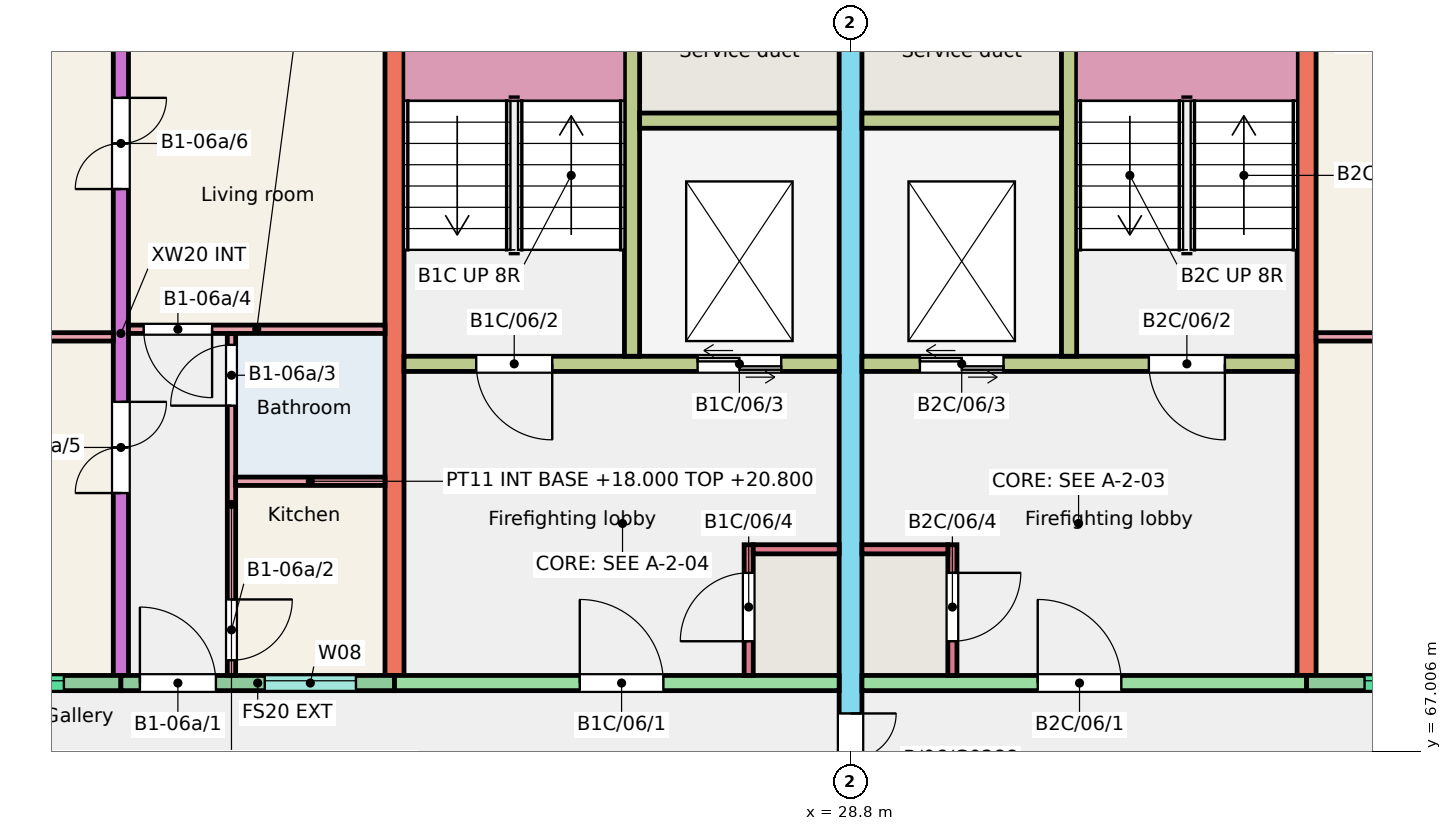
"""IFC4 building model, lengths in metres.
Left out: names, types, materials, properties, quantities, classifications, styles, units other than length and angle.
Written with IfcOpenShell. Run it as: python <this file> out.ifc"""

import sys

from ifc_helpers import new_model, si_unit, direction, frame, frame_2d, origin, place, context, subcontext, project, spatial, rectangle, extrude, element, fill, save


model = new_model("IFC4")
c1 = context("Model", 3, precision=1e-05, world=origin(), true_north=direction((0.0, 1.0)))
c2 = subcontext(c1, "Body", "Model", "MODEL_VIEW")
j1 = project(units=[si_unit("LENGTHUNIT", "METRE"), si_unit("PLANEANGLEUNIT", "RADIAN")], contexts=[c1])
p1 = place(None, origin())
s1 = spatial("IfcSite", under=j1, at=p1, CompositionType="ELEMENT")
p2 = place(p1, origin())
s2 = spatial("IfcBuilding", under=s1, at=p2, CompositionType="ELEMENT")
p3 = place(p2, frame((0.0, 0.0, 18.0)))
s3 = spatial("IfcBuildingStorey", under=s2, at=p3, CompositionType="ELEMENT", Elevation=18.0)
p4 = place(p3, frame((19.2, 68.0, 0.0), z_axis=(0.0, 0.0, 1.0), x_axis=(0.0, 1.0, 0.0)))
e1 = element("IfcWall", 1, at=p4, inside=s3, PredefinedType="SHEAR", context=c2, shape_type="SweptSolid", body=[
    extrude(rectangle(XDim=9.0, YDim=0.2, at=frame_2d((4.5, 0.0))), origin(), (0.0, 0.0, 1.0), 3.0),
])
p5 = place(p4, frame((2.4, 0.0, 0.0)))
e2 = element("IfcOpeningElement", 2, at=p5, cuts=e1, PredefinedType="OPENING", context=c2, shape_type="SweptSolid", body=[
    extrude(rectangle(XDim=1.2, YDim=2.1, at=frame_2d((0.6, 1.05))), frame((0.0, 0.11, 0.0), z_axis=(0.0, -1.0, 0.0), x_axis=(1.0, 0.0, 0.0)), (0.0, 0.0, 1.0), 0.22),
])
p6 = place(p4, frame((6.4, 0.0, 0.0)))
e3 = element("IfcOpeningElement", 3, at=p6, cuts=e1, PredefinedType="OPENING", context=c2, shape_type="SweptSolid", body=[
    extrude(rectangle(XDim=1.2, YDim=2.1, at=frame_2d((0.6, 1.05))), frame((0.0, 0.11, 0.0), z_axis=(0.0, -1.0, 0.0), x_axis=(1.0, 0.0, 0.0)), (0.0, 0.0, 1.0), 0.22),
])
p7 = place(p3, frame((22.8, 68.0, 0.0), z_axis=(0.0, 0.0, 1.0), x_axis=(0.0, 1.0, 0.0)))
e4 = element("IfcWall", 4, at=p7, inside=s3, PredefinedType="SHEAR", context=c2, shape_type="SweptSolid", body=[
    extrude(rectangle(XDim=9.0, YDim=0.25, at=frame_2d((4.5, 0.0))), origin(), (0.0, 0.0, 1.0), 3.0),
])
p8 = place(p3, frame((28.8, 66.0, 0.0), z_axis=(0.0, 0.0, 1.0), x_axis=(0.0, 1.0, 0.0)))
e5 = element("IfcWall", 5, at=p8, inside=s3, PredefinedType="SHEAR", context=c2, shape_type="SweptSolid", body=[
    extrude(rectangle(XDim=11.0, YDim=0.3, at=frame_2d((5.5, 0.0))), origin(), (0.0, 0.0, 1.0), 3.0),
])
p9 = place(p8, frame((0.3, 0.0, 0.0)))
e6 = element("IfcOpeningElement", 6, at=p9, cuts=e5, PredefinedType="OPENING", context=c2, shape_type="SweptSolid", body=[
    extrude(rectangle(XDim=1.2, YDim=2.1, at=frame_2d((0.6, 1.05))), frame((0.0, 0.16, 0.0), z_axis=(0.0, -1.0, 0.0), x_axis=(1.0, 0.0, 0.0)), (0.0, 0.0, 1.0), 0.32),
])
p10 = place(p3, frame((34.8, 68.0, 0.0), z_axis=(0.0, 0.0, 1.0), x_axis=(0.0, 1.0, 0.0)))
e7 = element("IfcWall", 7, at=p10, inside=s3, PredefinedType="SHEAR", context=c2, shape_type="SweptSolid", body=[
    extrude(rectangle(XDim=9.0, YDim=0.25, at=frame_2d((4.5, 0.0))), origin(), (0.0, 0.0, 1.0), 3.0),
])
p11 = place(p3, frame((15.6, 67.9, 0.0), z_axis=(0.0, 0.0, 1.0), x_axis=(1.0, 0.0, 0.0)))
e8 = element("IfcWall", 8, at=p11, inside=s3, PredefinedType="SOLIDWALL", context=c2, shape_type="SweptSolid", body=[
    extrude(rectangle(XDim=3.6, YDim=0.2, at=frame_2d((1.8, 0.0))), origin(), (0.0, 0.0, 1.0), 3.0),
])
p12 = place(p11, frame((0.75, 0.0, 1.2)))
e9 = element("IfcOpeningElement", 9, at=p12, cuts=e8, PredefinedType="OPENING", context=c2, shape_type="SweptSolid", body=[
    extrude(rectangle(XDim=2.1, YDim=1.2, at=frame_2d((1.05, 0.6))), frame((0.0, 0.11, 0.0), z_axis=(0.0, -1.0, 0.0), x_axis=(1.0, 0.0, 0.0)), (0.0, 0.0, 1.0), 0.22),
])
p13 = place(p3, frame((19.2, 67.9, 0.0), z_axis=(0.0, 0.0, 1.0), x_axis=(1.0, 0.0, 0.0)))
e10 = element("IfcWall", 10, at=p13, inside=s3, PredefinedType="SOLIDWALL", context=c2, shape_type="SweptSolid", body=[
    extrude(rectangle(XDim=3.6, YDim=0.2, at=frame_2d((1.8, 0.0))), origin(), (0.0, 0.0, 1.0), 3.0),
])
p14 = place(p13, frame((1.893, 0.0, 1.1)))
e11 = element("IfcOpeningElement", 11, at=p14, cuts=e10, PredefinedType="OPENING", context=c2, shape_type="SweptSolid", body=[
    extrude(rectangle(XDim=1.2, YDim=1.3, at=frame_2d((0.6, 0.65))), frame((0.0, 0.11, 0.0), z_axis=(0.0, -1.0, 0.0), x_axis=(1.0, 0.0, 0.0)), (0.0, 0.0, 1.0), 0.22),
])
p15 = place(p13, frame((0.25, 0.0, 0.0)))
e12 = element("IfcOpeningElement", 12, at=p15, cuts=e10, PredefinedType="OPENING", context=c2, shape_type="SweptSolid", body=[
    extrude(rectangle(XDim=1.0, YDim=2.1, at=frame_2d((0.5, 1.05))), frame((0.0, 0.11, 0.0), z_axis=(0.0, -1.0, 0.0), x_axis=(1.0, 0.0, 0.0)), (0.0, 0.0, 1.0), 0.22),
])
p16 = place(p3, frame((22.8, 67.9, 0.0), z_axis=(0.0, 0.0, 1.0), x_axis=(1.0, 0.0, 0.0)))
e13 = element("IfcWall", 13, at=p16, inside=s3, PredefinedType="SHEAR", context=c2, shape_type="SweptSolid", body=[
    extrude(rectangle(XDim=5.85, YDim=0.2, at=frame_2d((2.925, 0.0))), origin(), (0.0, 0.0, 1.0), 3.0),
])
p17 = place(p16, frame((2.438, 0.0, 0.0)))
e14 = element("IfcOpeningElement", 14, at=p17, cuts=e13, PredefinedType="OPENING", context=c2, shape_type="SweptSolid", body=[
    extrude(rectangle(XDim=1.1, YDim=2.1, at=frame_2d((0.55, 1.05))), frame((0.0, 0.11, 0.0), z_axis=(0.0, -1.0, 0.0), x_axis=(1.0, 0.0, 0.0)), (0.0, 0.0, 1.0), 0.22),
])
p18 = place(p3, frame((22.925, 72.1, 0.0), z_axis=(0.0, 0.0, 1.0), x_axis=(1.0, 0.0, 0.0)))
e15 = element("IfcWall", 15, at=p18, inside=s3, PredefinedType="SHEAR", context=c2, shape_type="SweptSolid", body=[
    extrude(rectangle(XDim=5.725, YDim=0.2, at=frame_2d((2.862, 0.0))), origin(), (0.0, 0.0, 1.0), 3.0),
])
p19 = place(p18, frame((0.95, 0.0, 0.0)))
e16 = element("IfcOpeningElement", 16, at=p19, cuts=e15, PredefinedType="OPENING", context=c2, shape_type="SweptSolid", body=[
    extrude(rectangle(XDim=1.0, YDim=2.1, at=frame_2d((0.5, 1.05))), frame((0.0, 0.11, 0.0), z_axis=(0.0, -1.0, 0.0), x_axis=(1.0, 0.0, 0.0)), (0.0, 0.0, 1.0), 0.22),
])
p20 = place(p18, frame((3.863, 0.0, 0.0)))
e17 = element("IfcOpeningElement", 17, at=p20, cuts=e15, PredefinedType="OPENING", context=c2, shape_type="SweptSolid", body=[
    extrude(rectangle(XDim=1.1, YDim=2.1, at=frame_2d((0.55, 1.05))), frame((0.0, 0.11, 0.0), z_axis=(0.0, -1.0, 0.0), x_axis=(1.0, 0.0, 0.0)), (0.0, 0.0, 1.0), 0.22),
])
p21 = place(p3, frame((25.925, 72.2, 0.0), z_axis=(0.0, 0.0, 1.0), x_axis=(0.0, 1.0, 0.0)))
e18 = element("IfcWall", 18, at=p21, inside=s3, PredefinedType="SHEAR", context=c2, shape_type="SweptSolid", body=[
    extrude(rectangle(XDim=4.8, YDim=0.2, at=frame_2d((2.4, 0.0))), origin(), (0.0, 0.0, 1.0), 3.0),
])
p22 = place(p3, frame((26.025, 75.3, 0.0), z_axis=(0.0, 0.0, 1.0), x_axis=(1.0, 0.0, 0.0)))
e19 = element("IfcWall", 19, at=p22, inside=s3, PredefinedType="SHEAR", context=c2, shape_type="SweptSolid", body=[
    extrude(rectangle(XDim=2.625, YDim=0.2, at=frame_2d((1.312, 0.0))), origin(), (0.0, 0.0, 1.0), 3.0),
])
p23 = place(p3, frame((27.46, 68.0, 0.0), z_axis=(0.0, 0.0, 1.0), x_axis=(0.0, 1.0, 0.0)))
e20 = element("IfcWall", 20, at=p23, inside=s3, PredefinedType="SHEAR", context=c2, shape_type="SweptSolid", body=[
    extrude(rectangle(XDim=1.72, YDim=0.12, at=frame_2d((0.86, 0.0))), origin(), (0.0, 0.0, 1.0), 3.0),
])
p24 = place(p23, frame((0.45, 0.0, 0.0)))
e21 = element("IfcOpeningElement", 21, at=p24, cuts=e20, PredefinedType="OPENING", context=c2, shape_type="SweptSolid", body=[
    extrude(rectangle(XDim=0.9, YDim=2.1, at=frame_2d((0.45, 1.05))), frame((0.0, 0.07, 0.0), z_axis=(0.0, -1.0, 0.0), x_axis=(1.0, 0.0, 0.0)), (0.0, 0.0, 1.0), 0.14),
])
p25 = place(p3, frame((27.52, 69.66, 0.0), z_axis=(0.0, 0.0, 1.0), x_axis=(1.0, 0.0, 0.0)))
e22 = element("IfcWall", 22, at=p25, inside=s3, PredefinedType="SHEAR", context=c2, shape_type="SweptSolid", body=[
    extrude(rectangle(XDim=1.13, YDim=0.12, at=frame_2d((0.565, 0.0))), origin(), (0.0, 0.0, 1.0), 3.0),
])
p26 = place(p3, frame((28.95, 67.9, 0.0), z_axis=(0.0, 0.0, 1.0), x_axis=(1.0, 0.0, 0.0)))
e23 = element("IfcWall", 23, at=p26, inside=s3, PredefinedType="SHEAR", context=c2, shape_type="SweptSolid", body=[
    extrude(rectangle(XDim=5.85, YDim=0.2, at=frame_2d((2.925, 0.0))), origin(), (0.0, 0.0, 1.0), 3.0),
])
p27 = place(p26, frame((2.312, 0.0, 0.0)))
e24 = element("IfcOpeningElement", 24, at=p27, cuts=e23, PredefinedType="OPENING", context=c2, shape_type="SweptSolid", body=[
    extrude(rectangle(XDim=1.1, YDim=2.1, at=frame_2d((0.55, 1.05))), frame((0.0, 0.11, 0.0), z_axis=(0.0, -1.0, 0.0), x_axis=(1.0, 0.0, 0.0)), (0.0, 0.0, 1.0), 0.22),
])
p28 = place(p3, frame((28.95, 72.1, 0.0), z_axis=(0.0, 0.0, 1.0), x_axis=(1.0, 0.0, 0.0)))
e25 = element("IfcWall", 25, at=p28, inside=s3, PredefinedType="SHEAR", context=c2, shape_type="SweptSolid", body=[
    extrude(rectangle(XDim=5.725, YDim=0.2, at=frame_2d((2.863, 0.0))), origin(), (0.0, 0.0, 1.0), 3.0),
])
p29 = place(p28, frame((3.775, 0.0, 0.0)))
e26 = element("IfcOpeningElement", 26, at=p29, cuts=e25, PredefinedType="OPENING", context=c2, shape_type="SweptSolid", body=[
    extrude(rectangle(XDim=1.0, YDim=2.1, at=frame_2d((0.5, 1.05))), frame((0.0, 0.11, 0.0), z_axis=(0.0, -1.0, 0.0), x_axis=(1.0, 0.0, 0.0)), (0.0, 0.0, 1.0), 0.22),
])
p30 = place(p28, frame((0.762, 0.0, 0.0)))
e27 = element("IfcOpeningElement", 27, at=p30, cuts=e25, PredefinedType="OPENING", context=c2, shape_type="SweptSolid", body=[
    extrude(rectangle(XDim=1.1, YDim=2.1, at=frame_2d((0.55, 1.05))), frame((0.0, 0.11, 0.0), z_axis=(0.0, -1.0, 0.0), x_axis=(1.0, 0.0, 0.0)), (0.0, 0.0, 1.0), 0.22),
])
p31 = place(p3, frame((31.675, 72.2, 0.0), z_axis=(0.0, 0.0, 1.0), x_axis=(0.0, 1.0, 0.0)))
e28 = element("IfcWall", 28, at=p31, inside=s3, PredefinedType="SHEAR", context=c2, shape_type="SweptSolid", body=[
    extrude(rectangle(XDim=4.8, YDim=0.2, at=frame_2d((2.4, 0.0))), origin(), (0.0, 0.0, 1.0), 3.0),
])
p32 = place(p3, frame((28.95, 75.3, 0.0), z_axis=(0.0, 0.0, 1.0), x_axis=(1.0, 0.0, 0.0)))
e29 = element("IfcWall", 29, at=p32, inside=s3, PredefinedType="SHEAR", context=c2, shape_type="SweptSolid", body=[
    extrude(rectangle(XDim=2.625, YDim=0.2, at=frame_2d((1.312, 0.0))), origin(), (0.0, 0.0, 1.0), 3.0),
])
p33 = place(p3, frame((30.14, 68.0, 0.0), z_axis=(0.0, 0.0, 1.0), x_axis=(0.0, 1.0, 0.0)))
e30 = element("IfcWall", 30, at=p33, inside=s3, PredefinedType="SHEAR", context=c2, shape_type="SweptSolid", body=[
    extrude(rectangle(XDim=1.72, YDim=0.12, at=frame_2d((0.86, 0.0))), origin(), (0.0, 0.0, 1.0), 3.0),
])
p34 = place(p33, frame((0.45, 0.0, 0.0)))
e31 = element("IfcOpeningElement", 31, at=p34, cuts=e30, PredefinedType="OPENING", context=c2, shape_type="SweptSolid", body=[
    extrude(rectangle(XDim=0.9, YDim=2.1, at=frame_2d((0.45, 1.05))), frame((0.0, 0.07, 0.0), z_axis=(0.0, -1.0, 0.0), x_axis=(1.0, 0.0, 0.0)), (0.0, 0.0, 1.0), 0.14),
])
p35 = place(p3, frame((28.95, 69.66, 0.0), z_axis=(0.0, 0.0, 1.0), x_axis=(1.0, 0.0, 0.0)))
e32 = element("IfcWall", 32, at=p35, inside=s3, PredefinedType="SHEAR", context=c2, shape_type="SweptSolid", body=[
    extrude(rectangle(XDim=1.13, YDim=0.12, at=frame_2d((0.565, 0.0))), origin(), (0.0, 0.0, 1.0), 3.0),
])
p36 = place(p3, frame((34.8, 67.9, 0.0), z_axis=(0.0, 0.0, 1.0), x_axis=(1.0, 0.0, 0.0)))
e33 = element("IfcWall", 33, at=p36, inside=s3, PredefinedType="SOLIDWALL", context=c2, shape_type="SweptSolid", body=[
    extrude(rectangle(XDim=3.6, YDim=0.2, at=frame_2d((1.8, 0.0))), origin(), (0.0, 0.0, 1.0), 3.0),
])
p37 = place(p36, frame((0.762, 0.0, 1.2)))
e34 = element("IfcOpeningElement", 34, at=p37, cuts=e33, PredefinedType="OPENING", context=c2, shape_type="SweptSolid", body=[
    extrude(rectangle(XDim=2.1, YDim=1.2, at=frame_2d((1.05, 0.6))), frame((0.0, 0.11, 0.0), z_axis=(0.0, -1.0, 0.0), x_axis=(1.0, 0.0, 0.0)), (0.0, 0.0, 1.0), 0.22),
])
p38 = place(p3, frame((20.655, 68.0, 0.0), z_axis=(0.0, 0.0, 1.0), x_axis=(0.0, 1.0, 0.0)))
e35 = element("IfcWall", 35, at=p38, inside=s3, PredefinedType="PARTITIONING", context=c2, shape_type="SweptSolid", body=[
    extrude(rectangle(XDim=4.5, YDim=0.11, at=frame_2d((2.25, 0.0))), origin(), (0.0, 0.0, 1.0), 2.8),
])
p39 = place(p38, frame((0.2, 0.0, 0.0)))
e36 = element("IfcOpeningElement", 36, at=p39, cuts=e35, PredefinedType="OPENING", context=c2, shape_type="SweptSolid", body=[
    extrude(rectangle(XDim=0.8, YDim=2.1, at=frame_2d((0.4, 1.05))), frame((0.0, 0.065, 0.0), z_axis=(0.0, -1.0, 0.0), x_axis=(1.0, 0.0, 0.0)), (0.0, 0.0, 1.0), 0.13),
])
p40 = place(p38, frame((3.55, 0.0, 0.0)))
e37 = element("IfcOpeningElement", 37, at=p40, cuts=e35, PredefinedType="OPENING", context=c2, shape_type="SweptSolid", body=[
    extrude(rectangle(XDim=0.8, YDim=2.1, at=frame_2d((0.4, 1.05))), frame((0.0, 0.065, 0.0), z_axis=(0.0, -1.0, 0.0), x_axis=(1.0, 0.0, 0.0)), (0.0, 0.0, 1.0), 0.13),
])
p41 = place(p3, frame((20.71, 70.555, 0.0), z_axis=(0.0, 0.0, 1.0), x_axis=(1.0, 0.0, 0.0)))
e38 = element("IfcWall", 38, at=p41, inside=s3, PredefinedType="PARTITIONING", context=c2, shape_type="SweptSolid", body=[
    extrude(rectangle(XDim=1.965, YDim=0.11, at=frame_2d((0.982, 0.0))), origin(), (0.0, 0.0, 1.0), 2.8),
])
p42 = place(p3, frame((19.3, 72.555, 0.0), z_axis=(0.0, 0.0, 1.0), x_axis=(1.0, 0.0, 0.0)))
e39 = element("IfcWall", 39, at=p42, inside=s3, PredefinedType="PARTITIONING", context=c2, shape_type="SweptSolid", body=[
    extrude(rectangle(XDim=3.375, YDim=0.11, at=frame_2d((1.688, 0.0))), origin(), (0.0, 0.0, 1.0), 2.8),
])
p43 = place(p42, frame((0.2, 0.0, 0.0)))
e40 = element("IfcOpeningElement", 40, at=p43, cuts=e39, PredefinedType="OPENING", context=c2, shape_type="SweptSolid", body=[
    extrude(rectangle(XDim=0.9, YDim=2.1, at=frame_2d((0.45, 1.05))), frame((0.0, 0.065, 0.0), z_axis=(0.0, -1.0, 0.0), x_axis=(1.0, 0.0, 0.0)), (0.0, 0.0, 1.0), 0.13),
])
p44 = place(p3, frame((15.7, 72.455, 0.0), z_axis=(0.0, 0.0, 1.0), x_axis=(1.0, 0.0, 0.0)))
e41 = element("IfcWall", 41, at=p44, inside=s3, PredefinedType="PARTITIONING", context=c2, shape_type="SweptSolid", body=[
    extrude(rectangle(XDim=3.4, YDim=0.11, at=frame_2d((1.7, 0.0))), origin(), (0.0, 0.0, 1.0), 2.75),
])
p45 = place(p3, frame((34.925, 72.455, 0.0), z_axis=(0.0, 0.0, 1.0), x_axis=(1.0, 0.0, 0.0)))
e42 = element("IfcWall", 42, at=p45, inside=s3, PredefinedType="PARTITIONING", context=c2, shape_type="SweptSolid", body=[
    extrude(rectangle(XDim=3.375, YDim=0.11, at=frame_2d((1.688, 0.0))), origin(), (0.0, 0.0, 1.0), 2.8),
])
p46 = place(p12, origin())
e43 = element("IfcWindow", 43, at=p46, inside=s3, PartitioningType="SINGLE_PANEL", PredefinedType="WINDOW", context=c2, shape_type="SweptSolid", body=[
    extrude(rectangle(XDim=2.1, YDim=1.2, at=frame_2d((1.05, 0.6))), frame((0.0, 0.06, 0.0), z_axis=(0.0, -1.0, 0.0), x_axis=(1.0, 0.0, 0.0)), (0.0, 0.0, 1.0), 0.06),
])
fill(e9, e43)
p47 = place(p14, origin())
e44 = element("IfcWindow", 44, at=p47, inside=s3, PartitioningType="SINGLE_PANEL", PredefinedType="WINDOW", context=c2, shape_type="SweptSolid", body=[
    extrude(rectangle(XDim=1.2, YDim=1.3, at=frame_2d((0.6, 0.65))), frame((0.0, 0.06, 0.0), z_axis=(0.0, -1.0, 0.0), x_axis=(1.0, 0.0, 0.0)), (0.0, 0.0, 1.0), 0.06),
])
fill(e11, e44)
p48 = place(p37, origin())
e45 = element("IfcWindow", 45, at=p48, inside=s3, PartitioningType="SINGLE_PANEL", PredefinedType="WINDOW", context=c2, shape_type="SweptSolid", body=[
    extrude(rectangle(XDim=2.1, YDim=1.2, at=frame_2d((1.05, 0.6))), frame((0.0, 0.06, 0.0), z_axis=(0.0, -1.0, 0.0), x_axis=(1.0, 0.0, 0.0)), (0.0, 0.0, 1.0), 0.06),
])
fill(e34, e45)
p49 = place(p15, origin())
e46 = element("IfcDoor", 46, at=p49, inside=s3, OperationType="SINGLE_SWING_LEFT", PredefinedType="DOOR", context=c2, shape_type="SweptSolid", body=[
    extrude(rectangle(XDim=1.0, YDim=2.1, at=frame_2d((0.5, 1.05))), frame((0.0, 0.025, 0.0), z_axis=(0.0, -1.0, 0.0), x_axis=(1.0, 0.0, 0.0)), (0.0, 0.0, 1.0), 0.05),
])
fill(e12, e46)
p50 = place(p39, origin())
e47 = element("IfcDoor", 47, at=p50, inside=s3, OperationType="SINGLE_SWING_RIGHT", PredefinedType="DOOR", context=c2, shape_type="SweptSolid", body=[
    extrude(rectangle(XDim=0.8, YDim=2.1, at=frame_2d((0.4, 1.05))), frame((0.0, 0.025, 0.0), z_axis=(0.0, -1.0, 0.0), x_axis=(1.0, 0.0, 0.0)), (0.0, 0.0, 1.0), 0.05),
])
fill(e36, e47)
p51 = place(p40, origin())
e48 = element("IfcDoor", 48, at=p51, inside=s3, OperationType="SINGLE_SWING_LEFT", PredefinedType="DOOR", context=c2, shape_type="SweptSolid", body=[
    extrude(rectangle(XDim=0.8, YDim=2.1, at=frame_2d((0.4, 1.05))), frame((0.0, 0.025, 0.0), z_axis=(0.0, -1.0, 0.0), x_axis=(1.0, 0.0, 0.0)), (0.0, 0.0, 1.0), 0.05),
])
fill(e37, e48)
p52 = place(p43, origin())
e49 = element("IfcDoor", 49, at=p52, inside=s3, OperationType="SINGLE_SWING_RIGHT", PredefinedType="DOOR", context=c2, shape_type="SweptSolid", body=[
    extrude(rectangle(XDim=0.9, YDim=2.1, at=frame_2d((0.45, 1.05))), frame((0.0, 0.025, 0.0), z_axis=(0.0, -1.0, 0.0), x_axis=(1.0, 0.0, 0.0)), (0.0, 0.0, 1.0), 0.05),
])
fill(e40, e49)
p53 = place(p5, origin())
e50 = element("IfcDoor", 50, at=p53, inside=s3, OperationType="DOUBLE_DOOR_SINGLE_SWING", PredefinedType="DOOR", context=c2, shape_type="SweptSolid", body=[
    extrude(rectangle(XDim=1.2, YDim=2.1, at=frame_2d((0.6, 1.05))), frame((0.0, 0.025, 0.0), z_axis=(0.0, -1.0, 0.0), x_axis=(1.0, 0.0, 0.0)), (0.0, 0.0, 1.0), 0.05),
])
fill(e2, e50)
p54 = place(p6, origin())
e51 = element("IfcDoor", 51, at=p54, inside=s3, OperationType="DOUBLE_DOOR_SINGLE_SWING", PredefinedType="DOOR", context=c2, shape_type="SweptSolid", body=[
    extrude(rectangle(XDim=1.2, YDim=2.1, at=frame_2d((0.6, 1.05))), frame((0.0, 0.025, 0.0), z_axis=(0.0, -1.0, 0.0), x_axis=(1.0, 0.0, 0.0)), (0.0, 0.0, 1.0), 0.05),
])
fill(e3, e51)
p55 = place(p17, origin())
e52 = element("IfcDoor", 52, at=p55, inside=s3, OperationType="SINGLE_SWING_LEFT", PredefinedType="DOOR", context=c2, shape_type="SweptSolid", body=[
    extrude(rectangle(XDim=1.1, YDim=2.1, at=frame_2d((0.55, 1.05))), frame((0.0, 0.025, 0.0), z_axis=(0.0, -1.0, 0.0), x_axis=(1.0, 0.0, 0.0)), (0.0, 0.0, 1.0), 0.05),
])
fill(e14, e52)
p56 = place(p19, origin())
e53 = element("IfcDoor", 53, at=p56, inside=s3, OperationType="SINGLE_SWING_RIGHT", PredefinedType="DOOR", context=c2, shape_type="SweptSolid", body=[
    extrude(rectangle(XDim=1.0, YDim=2.1, at=frame_2d((0.5, 1.05))), frame((0.0, 0.025, 0.0), z_axis=(0.0, -1.0, 0.0), x_axis=(1.0, 0.0, 0.0)), (0.0, 0.0, 1.0), 0.05),
])
fill(e16, e53)
p57 = place(p20, origin())
e54 = element("IfcDoor", 54, at=p57, inside=s3, OperationType="DOUBLE_DOOR_SLIDING", PredefinedType="DOOR", context=c2, shape_type="SweptSolid", body=[
    extrude(rectangle(XDim=1.1, YDim=2.1, at=frame_2d((0.55, 1.05))), frame((0.0, 0.025, 0.0), z_axis=(0.0, -1.0, 0.0), x_axis=(1.0, 0.0, 0.0)), (0.0, 0.0, 1.0), 0.05),
])
fill(e17, e54)
p58 = place(p24, origin())
e55 = element("IfcDoor", 55, at=p58, inside=s3, OperationType="SINGLE_SWING_LEFT", PredefinedType="DOOR", context=c2, shape_type="SweptSolid", body=[
    extrude(rectangle(XDim=0.9, YDim=2.1, at=frame_2d((0.45, 1.05))), frame((0.0, 0.025, 0.0), z_axis=(0.0, -1.0, 0.0), x_axis=(1.0, 0.0, 0.0)), (0.0, 0.0, 1.0), 0.05),
])
fill(e21, e55)
p59 = place(p27, origin())
e56 = element("IfcDoor", 56, at=p59, inside=s3, OperationType="SINGLE_SWING_LEFT", PredefinedType="DOOR", context=c2, shape_type="SweptSolid", body=[
    extrude(rectangle(XDim=1.1, YDim=2.1, at=frame_2d((0.55, 1.05))), frame((0.0, 0.025, 0.0), z_axis=(0.0, -1.0, 0.0), x_axis=(1.0, 0.0, 0.0)), (0.0, 0.0, 1.0), 0.05),
])
fill(e24, e56)
p60 = place(p29, origin())
e57 = element("IfcDoor", 57, at=p60, inside=s3, OperationType="SINGLE_SWING_RIGHT", PredefinedType="DOOR", context=c2, shape_type="SweptSolid", body=[
    extrude(rectangle(XDim=1.0, YDim=2.1, at=frame_2d((0.5, 1.05))), frame((0.0, 0.025, 0.0), z_axis=(0.0, -1.0, 0.0), x_axis=(1.0, 0.0, 0.0)), (0.0, 0.0, 1.0), 0.05),
])
fill(e26, e57)
p61 = place(p30, origin())
e58 = element("IfcDoor", 58, at=p61, inside=s3, OperationType="DOUBLE_DOOR_SLIDING", PredefinedType="DOOR", context=c2, shape_type="SweptSolid", body=[
    extrude(rectangle(XDim=1.1, YDim=2.1, at=frame_2d((0.55, 1.05))), frame((0.0, 0.025, 0.0), z_axis=(0.0, -1.0, 0.0), x_axis=(1.0, 0.0, 0.0)), (0.0, 0.0, 1.0), 0.05),
])
fill(e27, e58)
p62 = place(p34, origin())
e59 = element("IfcDoor", 59, at=p62, inside=s3, OperationType="SINGLE_SWING_RIGHT", PredefinedType="DOOR", context=c2, shape_type="SweptSolid", body=[
    extrude(rectangle(XDim=0.9, YDim=2.1, at=frame_2d((0.45, 1.05))), frame((0.0, 0.025, 0.0), z_axis=(0.0, -1.0, 0.0), x_axis=(1.0, 0.0, 0.0)), (0.0, 0.0, 1.0), 0.05),
])
fill(e31, e59)
p63 = place(p9, origin())
e60 = element("IfcDoor", 60, at=p63, inside=s3, OperationType="DOUBLE_DOOR_SINGLE_SWING", PredefinedType="DOOR", context=c2, shape_type="SweptSolid", body=[
    extrude(rectangle(XDim=1.2, YDim=2.1, at=frame_2d((0.6, 1.05))), frame((0.0, 0.025, 0.0), z_axis=(0.0, -1.0, 0.0), x_axis=(1.0, 0.0, 0.0)), (0.0, 0.0, 1.0), 0.05),
])
fill(e6, e60)
save(model, sys.argv[1])
